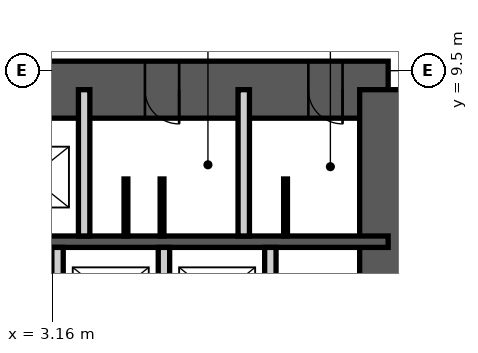
"""IFC4 building model, lengths in metres.
Left out: names, types, materials, properties, quantities, classifications, styles, units other than length and angle.
Written with IfcOpenShell. Run it as: python <this file> out.ifc"""

import sys

from ifc_helpers import new_model, si_unit, direction, frame, frame_2d, origin, place, context, subcontext, project, spatial, rectangle, extrude, element, fill, save


model = new_model("IFC4")
c1 = context("Model", 3, precision=1e-05, world=origin(), true_north=direction((0.0, 1.0)))
c2 = subcontext(c1, "Body", "Model", "MODEL_VIEW")
j1 = project(units=[si_unit("LENGTHUNIT", "METRE"), si_unit("PLANEANGLEUNIT", "RADIAN")], contexts=[c1])
p1 = place(None, origin())
s1 = spatial("IfcSite", under=j1, at=p1, CompositionType="ELEMENT")
p2 = place(p1, origin())
s2 = spatial("IfcBuilding", under=s1, at=p2, CompositionType="ELEMENT")
p3 = place(p2, frame((0.0, 0.0, 82.0)))
s3 = spatial("IfcBuildingStorey", under=s2, at=p3, CompositionType="ELEMENT", Elevation=82.0)
p4 = place(p3, frame((-12.0, 9.0, 0.0), z_axis=(0.0, 0.0, 1.0), x_axis=(1.0, 0.0, 0.0)))
e1 = element("IfcWall", 1, at=p4, inside=s3, PredefinedType="SHEAR", context=c2, shape_type="SweptSolid", body=[
    extrude(rectangle(XDim=24.0, YDim=1.5, at=frame_2d((12.0, 0.0))), origin(), (0.0, 0.0, 1.0), 5.0),
])
p5 = place(p4, frame((10.4, 0.0, 0.0)))
e2 = element("IfcOpeningElement", 2, at=p5, cuts=e1, PredefinedType="OPENING", context=c2, shape_type="SweptSolid", body=[
    extrude(rectangle(XDim=1.0, YDim=2.1, at=frame_2d((0.5, 1.05))), frame((0.0, 0.76, 0.0), z_axis=(0.0, -1.0, 0.0), x_axis=(1.0, 0.0, 0.0)), (0.0, 0.0, 1.0), 1.52),
])
p6 = place(p4, frame((17.6, 0.0, 0.0)))
e3 = element("IfcOpeningElement", 3, at=p6, cuts=e1, PredefinedType="OPENING", context=c2, shape_type="SweptSolid", body=[
    extrude(rectangle(XDim=0.9, YDim=2.1, at=frame_2d((0.45, 1.05))), frame((0.0, 0.76, 0.0), z_axis=(0.0, -1.0, 0.0), x_axis=(1.0, 0.0, 0.0)), (0.0, 0.0, 1.0), 1.52),
])
p7 = place(p4, frame((21.9, 0.0, 0.0)))
e4 = element("IfcOpeningElement", 4, at=p7, cuts=e1, PredefinedType="OPENING", context=c2, shape_type="SweptSolid", body=[
    extrude(rectangle(XDim=0.9, YDim=2.1, at=frame_2d((0.45, 1.05))), frame((0.0, 0.76, 0.0), z_axis=(0.0, -1.0, 0.0), x_axis=(1.0, 0.0, 0.0)), (0.0, 0.0, 1.0), 1.52),
])
p8 = place(p3, frame((12.0, -9.0, 0.0), z_axis=(0.0, 0.0, 1.0), x_axis=(0.0, 1.0, 0.0)))
e5 = element("IfcWall", 5, at=p8, inside=s3, PredefinedType="SHEAR", context=c2, shape_type="SweptSolid", body=[
    extrude(rectangle(XDim=18.0, YDim=1.5, at=frame_2d((9.0, 0.0))), origin(), (0.0, 0.0, 1.0), 5.0),
])
p9 = place(p8, frame((8.1, 0.0, 0.0)))
e6 = element("IfcOpeningElement", 6, at=p9, cuts=e5, PredefinedType="OPENING", context=c2, shape_type="SweptSolid", body=[
    extrude(rectangle(XDim=1.8, YDim=2.1, at=frame_2d((0.9, 1.05))), frame((0.0, 0.76, 0.0), z_axis=(0.0, -1.0, 0.0), x_axis=(1.0, 0.0, 0.0)), (0.0, 0.0, 1.0), 1.52),
])
p10 = place(p3, frame((-12.0, 5.0, 0.0), z_axis=(0.0, 0.0, 1.0), x_axis=(1.0, 0.0, 0.0)))
e7 = element("IfcWall", 7, at=p10, inside=s3, PredefinedType="SHEAR", context=c2, shape_type="SweptSolid", body=[
    extrude(rectangle(XDim=24.0, YDim=0.3, at=frame_2d((12.0, 0.0))), origin(), (0.0, 0.0, 1.0), 5.0),
])
for number, where, z_axis, x_axis in (
    (8, (4.0, 5.15, 0.0), (0.0, 0.0, 1.0), (0.0, 1.0, 0.0)),
    (9, (8.2, 5.15, 0.0), (0.0, 0.0, 1.0), (0.0, 1.0, 0.0)),
):
    element("IfcWall", number, at=place(p3, frame(where, z_axis=z_axis, x_axis=x_axis)), inside=s3, PredefinedType="PARTITIONING", context=c2, shape_type="SweptSolid", body=[
        extrude(rectangle(XDim=3.85, YDim=0.3, at=frame_2d((1.925, 0.0))), origin(), (0.0, 0.0, 1.0), 4.78),
    ])
for number, where, z_axis, x_axis in (
    (10, (3.3, 2.2, 0.0), (0.0, 0.0, 1.0), (0.0, 1.0, 0.0)),
    (11, (6.1, 2.2, 0.0), (0.0, 0.0, 1.0), (0.0, 1.0, 0.0)),
    (12, (8.9, 2.2, 0.0), (0.0, 0.0, 1.0), (0.0, 1.0, 0.0)),
):
    element("IfcWall", number, at=place(p3, frame(where, z_axis=z_axis, x_axis=x_axis)), inside=s3, PredefinedType="PARTITIONING", context=c2, shape_type="SweptSolid", body=[
        extrude(rectangle(XDim=2.65, YDim=0.3, at=frame_2d((1.325, 0.0))), origin(), (0.0, 0.0, 1.0), 4.78),
    ])
for number, where, z_axis, x_axis in (
    (13, (5.1, 5.15, 0.0), (0.0, 0.0, 1.0), (0.0, 1.0, 0.0)),
    (14, (6.05, 5.15, 0.0), (0.0, 0.0, 1.0), (0.0, 1.0, 0.0)),
    (15, (9.3, 5.15, 0.0), (0.0, 0.0, 1.0), (0.0, 1.0, 0.0)),
):
    element("IfcWall", number, at=place(p3, frame(where, z_axis=z_axis, x_axis=x_axis)), inside=s3, PredefinedType="PARTITIONING", context=c2, shape_type="SweptSolid", body=[
        extrude(rectangle(XDim=1.5, YDim=0.1, at=frame_2d((0.75, 0.0))), origin(), (0.0, 0.0, 1.0), 2.1),
    ])
p11 = place(p6, origin())
e16 = element("IfcDoor", 16, at=p11, inside=s3, OperationType="SINGLE_SWING_RIGHT", PredefinedType="DOOR", context=c2, shape_type="SweptSolid", body=[
    extrude(rectangle(XDim=0.9, YDim=2.1, at=frame_2d((0.45, 1.05))), frame((0.0, 0.025, 0.0), z_axis=(0.0, -1.0, 0.0), x_axis=(1.0, 0.0, 0.0)), (0.0, 0.0, 1.0), 0.05),
])
fill(e3, e16)
p12 = place(p7, origin())
e17 = element("IfcDoor", 17, at=p12, inside=s3, OperationType="SINGLE_SWING_RIGHT", PredefinedType="DOOR", context=c2, shape_type="SweptSolid", body=[
    extrude(rectangle(XDim=0.9, YDim=2.1, at=frame_2d((0.45, 1.05))), frame((0.0, 0.025, 0.0), z_axis=(0.0, -1.0, 0.0), x_axis=(1.0, 0.0, 0.0)), (0.0, 0.0, 1.0), 0.05),
])
fill(e4, e17)
save(model, sys.argv[1])
